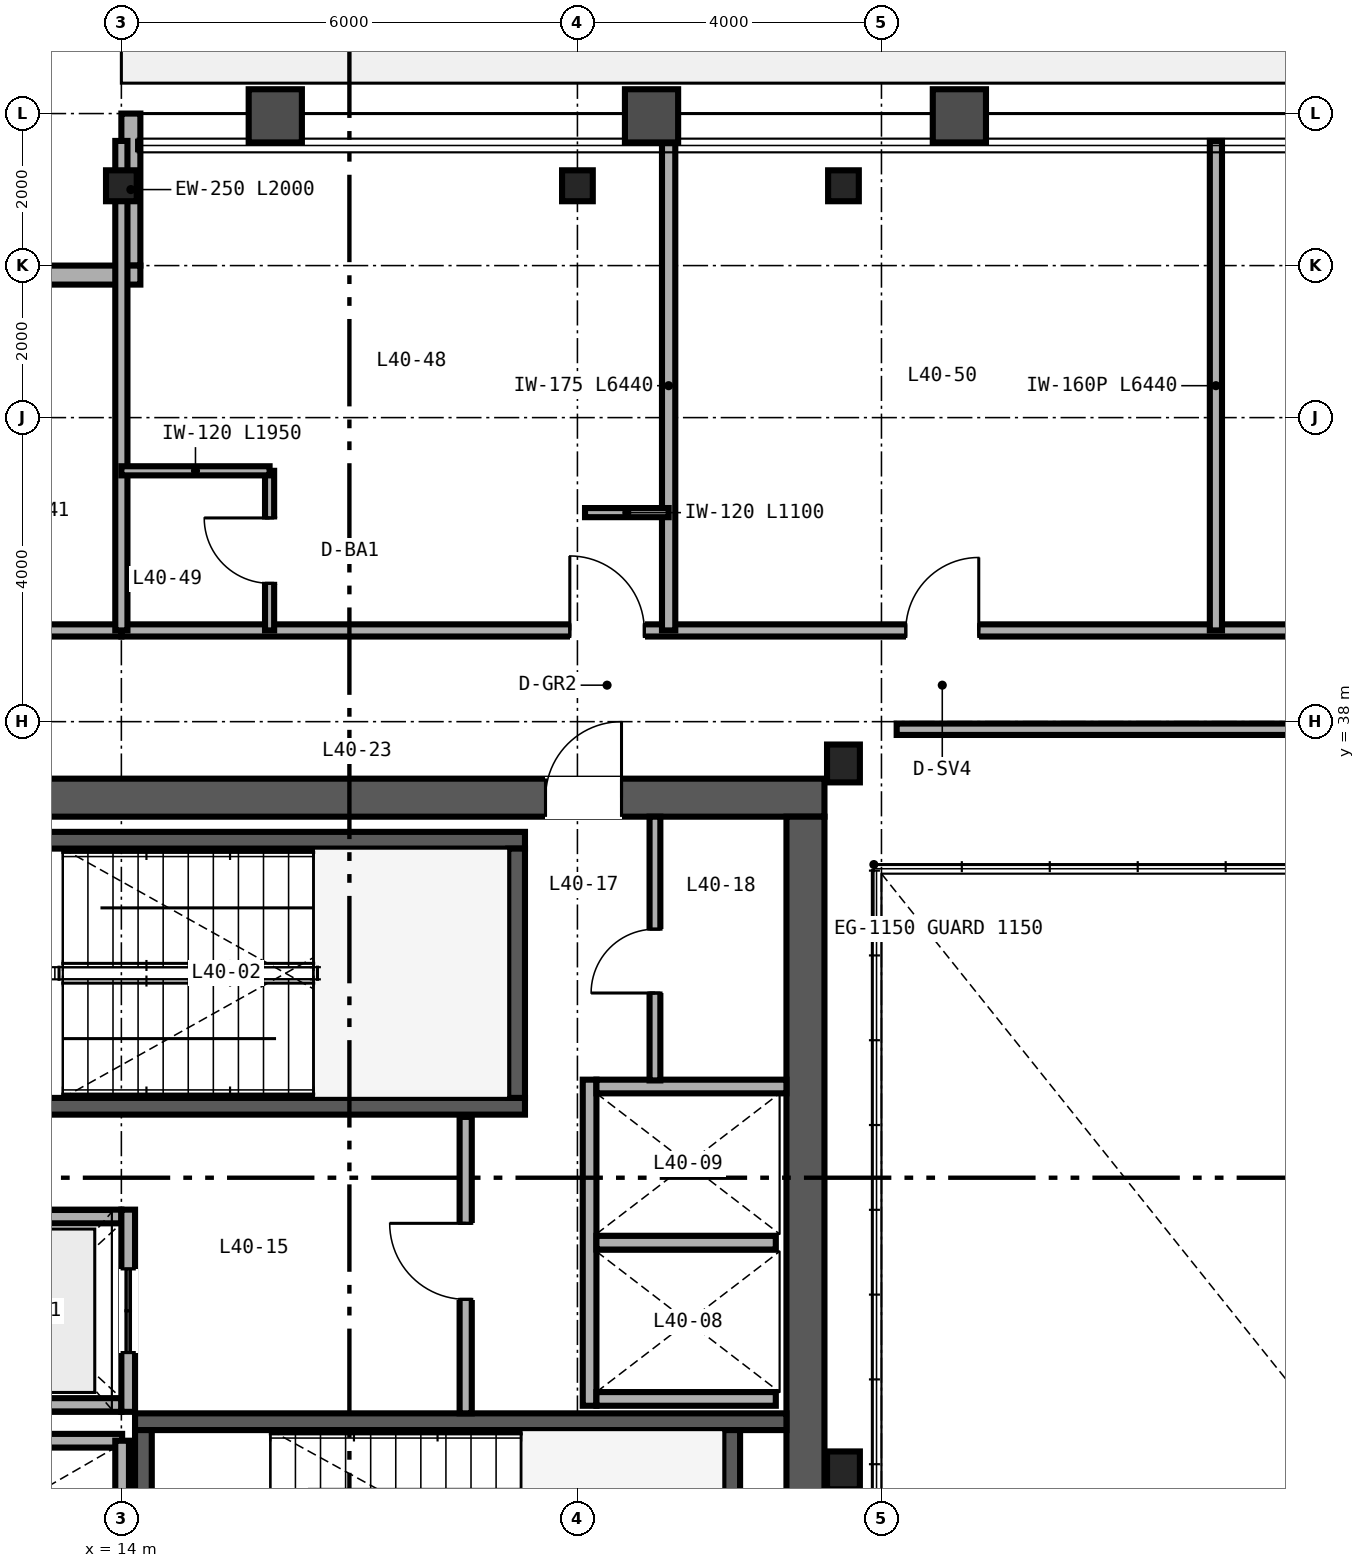
"""IFC4 building model, lengths in metres.
Left out: names, types, materials, properties, quantities, classifications, styles, units other than length and angle.
Written with IfcOpenShell. Run it as: python <this file> out.ifc"""

import sys

from ifc_helpers import new_model, si_unit, direction, frame, frame_2d, origin, origin_2d, place, context, subcontext, project, spatial, rectangle, i_section, extrude, source, transform, mapped, element, fill, save


model = new_model("IFC4")
c1 = context("Model", 3, precision=1e-05, world=origin(), true_north=direction((0.0, 1.0)))
c2 = subcontext(c1, "Body", "Model", "MODEL_VIEW")
j1 = project(units=[si_unit("LENGTHUNIT", "METRE"), si_unit("PLANEANGLEUNIT", "RADIAN")], contexts=[c1])
p1 = place(None, origin())
s1 = spatial("IfcSite", under=j1, at=p1, CompositionType="ELEMENT")
p2 = place(p1, origin())
s2 = spatial("IfcBuilding", under=s1, at=p2, CompositionType="ELEMENT")
p3 = place(p2, frame((0.0, 0.0, 163.2)))
s3 = spatial("IfcBuildingStorey", under=s2, at=p3, CompositionType="ELEMENT", Elevation=163.2)
p4 = place(p3, frame((10.75, 37.0, 0.0), z_axis=(0.0, 0.0, 1.0), x_axis=(1.0, 0.0, 0.0)))
e1 = element("IfcWall", 1, at=p4, inside=s3, PredefinedType="SHEAR", context=c2, shape_type="SweptSolid", body=[
    extrude(rectangle(XDim=12.5, YDim=0.5, at=frame_2d((6.25, 0.0))), origin(), (0.0, 0.0, 1.0), 3.37),
])
p5 = place(p4, frame((8.83, 0.0, 0.0)))
e2 = element("IfcOpeningElement", 2, at=p5, cuts=e1, PredefinedType="OPENING", context=c2, shape_type="SweptSolid", body=[
    extrude(rectangle(XDim=1.0, YDim=2.15, at=frame_2d((0.5, 1.075))), frame((0.0, 0.26, 0.0), z_axis=(0.0, -1.0, 0.0), x_axis=(1.0, 0.0, 0.0)), (0.0, 0.0, 1.0), 0.52),
])
p6 = place(p3, frame((23.0, 15.25, 0.0), z_axis=(0.0, 0.0, 1.0), x_axis=(0.0, 1.0, 0.0)))
e3 = element("IfcWall", 3, at=p6, inside=s3, PredefinedType="SHEAR", context=c2, shape_type="SweptSolid", body=[
    extrude(rectangle(XDim=21.5, YDim=0.5, at=frame_2d((10.75, 0.0))), origin(), (0.0, 0.0, 1.0), 3.37),
])
p7 = place(p3, frame((11.25, 32.94, 0.0), z_axis=(0.0, 0.0, 1.0), x_axis=(1.0, 0.0, 0.0)))
e4 = element("IfcWall", 4, at=p7, inside=s3, PredefinedType="SHEAR", context=c2, shape_type="SweptSolid", body=[
    extrude(rectangle(XDim=8.06, YDim=0.22, at=frame_2d((4.03, 0.0))), origin(), (0.0, 0.0, 1.0), 3.4),
])
p8 = place(p7, frame((0.67, 0.0, 0.0)))
e5 = element("IfcOpeningElement", 5, at=p8, cuts=e4, PredefinedType="OPENING", context=c2, shape_type="SweptSolid", body=[
    extrude(rectangle(XDim=1.05, YDim=2.15, at=frame_2d((0.525, 1.075))), frame((0.0, 0.12, 0.0), z_axis=(0.0, -1.0, 0.0), x_axis=(1.0, 0.0, 0.0)), (0.0, 0.0, 1.0), 0.24),
])
p9 = place(p3, frame((11.25, 36.44, 0.0), z_axis=(0.0, 0.0, 1.0), x_axis=(1.0, 0.0, 0.0)))
e6 = element("IfcWall", 6, at=p9, inside=s3, PredefinedType="SHEAR", context=c2, shape_type="SweptSolid", body=[
    extrude(rectangle(XDim=8.06, YDim=0.22, at=frame_2d((4.03, 0.0))), origin(), (0.0, 0.0, 1.0), 3.4),
])
p10 = place(p3, frame((19.2, 33.05, 0.0), z_axis=(0.0, 0.0, 1.0), x_axis=(0.0, 1.0, 0.0)))
e7 = element("IfcWall", 7, at=p10, inside=s3, PredefinedType="SHEAR", context=c2, shape_type="SweptSolid", body=[
    extrude(rectangle(XDim=3.28, YDim=0.22, at=frame_2d((1.64, 0.0))), origin(), (0.0, 0.0, 1.0), 3.4),
])
p11 = place(p3, frame((14.18, 28.79, 0.0), z_axis=(0.0, 0.0, 1.0), x_axis=(1.0, 0.0, 0.0)))
e8 = element("IfcWall", 8, at=p11, inside=s3, PredefinedType="SHEAR", context=c2, shape_type="SweptSolid", body=[
    extrude(rectangle(XDim=8.57, YDim=0.22, at=frame_2d((4.285, 0.0))), origin(), (0.0, 0.0, 1.0), 3.4),
])
for number, where, z_axis, x_axis in (
    (9, (14.29, 25.4, 0.0), (0.0, 0.0, 1.0), (0.0, 1.0, 0.0)),
    (10, (22.03, 25.4, 0.0), (0.0, 0.0, 1.0), (0.0, 1.0, 0.0)),
):
    element("IfcWall", number, at=place(p3, frame(where, z_axis=z_axis, x_axis=x_axis)), inside=s3, PredefinedType="SHEAR", context=c2, shape_type="SweptSolid", body=[
        extrude(rectangle(XDim=3.28, YDim=0.22, at=frame_2d((1.64, 0.0))), origin(), (0.0, 0.0, 1.0), 3.4),
    ])
m1 = source(origin(), c2, "Body", "SweptSolid", [
    extrude(i_section(OverallWidth=0.432, OverallDepth=0.498, WebThickness=0.056, FlangeThickness=0.089, FilletRadius=0.025, at=origin_2d()), origin(), (0.0, 0.0, 1.0), 3.37),
])
for number, where, z_axis, x_axis in (
    (11, (23.5, 28.15, 0.0), (0.0, 0.0, 1.0), (1.0, 0.0, 0.0)),
    (12, (23.5, 37.45, 0.0), (0.0, 0.0, 1.0), (1.0, 0.0, 0.0)),
):
    element("IfcColumn", number, at=place(p3, frame(where, z_axis=z_axis, x_axis=x_axis)), inside=s3, PredefinedType="COLUMN", context=c2, shape_type="MappedRepresentation", body=[
        mapped(m1, transform((0.0, 0.0, 0.0), scale=1.0)),
    ])
m2 = source(origin(), c2, "Body", "SweptSolid", [
    extrude(i_section(OverallWidth=0.404, OverallDepth=0.407, WebThickness=0.027, FlangeThickness=0.044, FilletRadius=0.025, at=origin_2d()), origin(), (0.0, 0.0, 1.0), 3.37),
])
for number, where, z_axis, x_axis in (
    (13, (14.0, 45.05, 0.0), (0.0, 0.0, 1.0), (1.0, 0.0, 0.0)),
    (14, (20.0, 45.05, 0.0), (0.0, 0.0, 1.0), (1.0, 0.0, 0.0)),
    (15, (23.5, 45.05, 0.0), (0.0, 0.0, 1.0), (1.0, 0.0, 0.0)),
):
    element("IfcColumn", number, at=place(p3, frame(where, z_axis=z_axis, x_axis=x_axis)), inside=s3, PredefinedType="COLUMN", context=c2, shape_type="MappedRepresentation", body=[
        mapped(m2, transform((0.0, 0.0, 0.0), scale=1.0)),
    ])
p12 = place(p3, frame((14.125, 46.0, 0.0), z_axis=(0.0, 0.0, 1.0), x_axis=(0.0, -1.0, 0.0)))
e16 = element("IfcWall", 16, at=p12, inside=s3, PredefinedType="SOLIDWALL", context=c2, shape_type="SweptSolid", body=[
    extrude(rectangle(XDim=2.0, YDim=0.25, at=frame_2d((1.0, 0.0))), origin(), (0.0, 0.0, 1.0), 2.677),
])
p13 = place(p3, frame((14.25, 43.875, 0.0), z_axis=(0.0, 0.0, 1.0), x_axis=(-1.0, 0.0, 0.0)))
e17 = element("IfcWall", 17, at=p13, inside=s3, PredefinedType="SOLIDWALL", context=c2, shape_type="SweptSolid", body=[
    extrude(rectangle(XDim=2.0, YDim=0.25, at=frame_2d((1.0, 0.0))), origin(), (0.0, 0.0, 1.0), 3.37),
])
p14 = place(p3, frame((20.16, 29.0, 0.0), z_axis=(0.0, 0.0, 1.0), x_axis=(0.0, 1.0, 0.0)))
e18 = element("IfcWall", 18, at=p14, inside=s3, PredefinedType="SOLIDWALL", context=c2, shape_type="SweptSolid", body=[
    extrude(rectangle(XDim=4.29, YDim=0.18, at=frame_2d((2.145, 0.0))), origin(), (0.0, 0.0, 1.0), 3.37),
])
p15 = place(p3, frame((20.25, 29.09, 0.0), z_axis=(0.0, 0.0, 1.0), x_axis=(1.0, 0.0, 0.0)))
e19 = element("IfcWall", 19, at=p15, inside=s3, PredefinedType="SOLIDWALL", context=c2, shape_type="SweptSolid", body=[
    extrude(rectangle(XDim=2.36, YDim=0.18, at=frame_2d((1.18, 0.0))), origin(), (0.0, 0.0, 1.0), 3.37),
])
p16 = place(p3, frame((20.25, 33.2, 0.0), z_axis=(0.0, 0.0, 1.0), x_axis=(1.0, 0.0, 0.0)))
e20 = element("IfcWall", 20, at=p16, inside=s3, PredefinedType="SOLIDWALL", context=c2, shape_type="SweptSolid", body=[
    extrude(rectangle(XDim=2.5, YDim=0.18, at=frame_2d((1.25, 0.0))), origin(), (0.0, 0.0, 1.0), 3.37),
])
p17 = place(p3, frame((20.25, 31.145, 0.0), z_axis=(0.0, 0.0, 1.0), x_axis=(1.0, 0.0, 0.0)))
e21 = element("IfcWall", 21, at=p17, inside=s3, PredefinedType="SOLIDWALL", context=c2, shape_type="SweptSolid", body=[
    extrude(rectangle(XDim=2.36, YDim=0.18, at=frame_2d((1.18, 0.0))), origin(), (0.0, 0.0, 1.0), 3.37),
])
for number, where, z_axis, x_axis in (
    (22, (11.5, 29.01, 0.0), (0.0, 0.0, 1.0), (1.0, 0.0, 0.0)),
    (23, (11.5, 31.49, 0.0), (0.0, 0.0, 1.0), (1.0, 0.0, 0.0)),
):
    element("IfcWall", number, at=place(p3, frame(where, z_axis=z_axis, x_axis=x_axis)), inside=s3, PredefinedType="SOLIDWALL", context=c2, shape_type="SweptSolid", body=[
        extrude(rectangle(XDim=2.5, YDim=0.18, at=frame_2d((1.25, 0.0))), origin(), (0.0, 0.0, 1.0), 3.37),
    ])
p18 = place(p3, frame((14.09, 28.92, 0.0), z_axis=(0.0, 0.0, 1.0), x_axis=(0.0, 1.0, 0.0)))
e24 = element("IfcWall", 24, at=p18, inside=s3, PredefinedType="SOLIDWALL", context=c2, shape_type="SweptSolid", body=[
    extrude(rectangle(XDim=2.66, YDim=0.18, at=frame_2d((1.33, 0.0))), origin(), (0.0, 0.0, 1.0), 3.37),
])
p19 = place(p18, frame((0.78, 0.0, 0.0)))
e25 = element("IfcOpeningElement", 25, at=p19, cuts=e24, PredefinedType="OPENING", context=c2, shape_type="SweptSolid", body=[
    extrude(rectangle(XDim=1.1, YDim=2.2, at=frame_2d((0.55, 1.1))), frame((0.0, 0.1, 0.0), z_axis=(0.0, -1.0, 0.0), x_axis=(1.0, 0.0, 0.0)), (0.0, 0.0, 1.0), 0.2),
])
p20 = place(p3, frame((11.5, 28.54, 0.0), z_axis=(0.0, 0.0, 1.0), x_axis=(1.0, 0.0, 0.0)))
e26 = element("IfcWall", 26, at=p20, inside=s3, PredefinedType="SOLIDWALL", context=c2, shape_type="SweptSolid", body=[
    extrude(rectangle(XDim=2.51, YDim=0.18, at=frame_2d((1.255, 0.0))), origin(), (0.0, 0.0, 1.0), 3.37),
])
p21 = place(p3, frame((14.01, 25.46, 0.0), z_axis=(0.0, 0.0, 1.0), x_axis=(0.0, 1.0, 0.0)))
e27 = element("IfcWall", 27, at=p21, inside=s3, PredefinedType="SOLIDWALL", context=c2, shape_type="SweptSolid", body=[
    extrude(rectangle(XDim=3.08, YDim=0.18, at=frame_2d((1.54, 0.0))), origin(), (0.0, 0.0, 1.0), 3.37),
])
p22 = place(p3, frame((18.53, 28.9, 0.0), z_axis=(0.0, 0.0, 1.0), x_axis=(0.0, 1.0, 0.0)))
e28 = element("IfcWall", 28, at=p22, inside=s3, PredefinedType="PARTITIONING", context=c2, shape_type="SweptSolid", body=[
    extrude(rectangle(XDim=3.9, YDim=0.16, at=frame_2d((1.95, 0.0))), origin(), (0.0, 0.0, 1.0), 3.37),
])
p23 = place(p22, frame((1.5, 0.0, 0.0)))
e29 = element("IfcOpeningElement", 29, at=p23, cuts=e28, PredefinedType="OPENING", context=c2, shape_type="SweptSolid", body=[
    extrude(rectangle(XDim=1.0, YDim=2.15, at=frame_2d((0.5, 1.075))), frame((0.0, 0.09, 0.0), z_axis=(0.0, -1.0, 0.0), x_axis=(1.0, 0.0, 0.0)), (0.0, 0.0, 1.0), 0.18),
])
p24 = place(p3, frame((21.02, 33.28, 0.0), z_axis=(0.0, 0.0, 1.0), x_axis=(0.0, 1.0, 0.0)))
e30 = element("IfcWall", 30, at=p24, inside=s3, PredefinedType="PARTITIONING", context=c2, shape_type="SweptSolid", body=[
    extrude(rectangle(XDim=3.47, YDim=0.142, at=frame_2d((1.735, 0.0))), origin(), (0.0, 0.0, 1.0), 3.37),
])
p25 = place(p24, frame((1.15, 0.0, 0.0)))
e31 = element("IfcOpeningElement", 31, at=p25, cuts=e30, PredefinedType="OPENING", context=c2, shape_type="SweptSolid", body=[
    extrude(rectangle(XDim=0.84, YDim=2.1, at=frame_2d((0.42, 1.05))), frame((0.0, 0.081, 0.0), z_axis=(0.0, -1.0, 0.0), x_axis=(1.0, 0.0, 0.0)), (0.0, 0.0, 1.0), 0.162),
])
p26 = place(p3, frame((24.2, 37.9, 0.0), z_axis=(0.0, 0.0, 1.0), x_axis=(1.0, 0.0, 0.0)))
e32 = element("IfcWall", 32, at=p26, inside=s3, PredefinedType="PARTITIONING", context=c2, shape_type="SweptSolid", body=[
    extrude(rectangle(XDim=15.6, YDim=0.15, at=frame_2d((7.8, 0.0))), origin(), (0.0, 0.0, 1.0), 3.37),
])
p27 = place(p26, frame((7.0, 0.0, 0.0)))
e33 = element("IfcOpeningElement", 33, at=p27, cuts=e32, PredefinedType="OPENING", context=c2, shape_type="SweptSolid", body=[
    extrude(rectangle(XDim=0.96, YDim=2.15, at=frame_2d((0.48, 1.075))), frame((0.0, 0.085, 0.0), z_axis=(0.0, -1.0, 0.0), x_axis=(1.0, 0.0, 0.0)), (0.0, 0.0, 1.0), 0.17),
])
p28 = place(p3, frame((10.0, 39.2, 0.0), z_axis=(0.0, 0.0, 1.0), x_axis=(1.0, 0.0, 0.0)))
e34 = element("IfcWall", 34, at=p28, inside=s3, PredefinedType="PARTITIONING", context=c2, shape_type="SweptSolid", body=[
    extrude(rectangle(XDim=4.0, YDim=0.16, at=frame_2d((2.0, 0.0))), origin(), (0.0, 0.0, 1.0), 3.37),
])
p29 = place(p28, frame((1.52, 0.0, 0.0)))
e35 = element("IfcOpeningElement", 35, at=p29, cuts=e34, PredefinedType="OPENING", context=c2, shape_type="SweptSolid", body=[
    extrude(rectangle(XDim=0.96, YDim=2.15, at=frame_2d((0.48, 1.075))), frame((0.0, 0.09, 0.0), z_axis=(0.0, -1.0, 0.0), x_axis=(1.0, 0.0, 0.0)), (0.0, 0.0, 1.0), 0.18),
])
p30 = place(p3, frame((14.0, 39.2, 0.0), z_axis=(0.0, 0.0, 1.0), x_axis=(1.0, 0.0, 0.0)))
e36 = element("IfcWall", 36, at=p30, inside=s3, PredefinedType="PARTITIONING", context=c2, shape_type="SweptSolid", body=[
    extrude(rectangle(XDim=36.0, YDim=0.16, at=frame_2d((18.0, 0.0))), origin(), (0.0, 0.0, 1.0), 2.913),
])
p31 = place(p30, frame((5.9, 0.0, 0.0)))
e37 = element("IfcOpeningElement", 37, at=p31, cuts=e36, PredefinedType="OPENING", context=c2, shape_type="SweptSolid", body=[
    extrude(rectangle(XDim=0.98, YDim=2.2, at=frame_2d((0.49, 1.1))), frame((0.0, 0.09, 0.0), z_axis=(0.0, -1.0, 0.0), x_axis=(1.0, 0.0, 0.0)), (0.0, 0.0, 1.0), 0.18),
])
p32 = place(p30, frame((10.32, 0.0, 0.0)))
e38 = element("IfcOpeningElement", 38, at=p32, cuts=e36, PredefinedType="OPENING", context=c2, shape_type="SweptSolid", body=[
    extrude(rectangle(XDim=0.96, YDim=2.15, at=frame_2d((0.48, 1.075))), frame((0.0, 0.09, 0.0), z_axis=(0.0, -1.0, 0.0), x_axis=(1.0, 0.0, 0.0)), (0.0, 0.0, 1.0), 0.18),
])
p33 = place(p30, frame((17.52, 0.0, 0.0)))
e39 = element("IfcOpeningElement", 39, at=p33, cuts=e36, PredefinedType="OPENING", context=c2, shape_type="SweptSolid", body=[
    extrude(rectangle(XDim=0.96, YDim=2.15, at=frame_2d((0.48, 1.075))), frame((0.0, 0.09, 0.0), z_axis=(0.0, -1.0, 0.0), x_axis=(1.0, 0.0, 0.0)), (0.0, 0.0, 1.0), 0.18),
])
p34 = place(p30, frame((24.72, 0.0, 0.0)))
e40 = element("IfcOpeningElement", 40, at=p34, cuts=e36, PredefinedType="OPENING", context=c2, shape_type="SweptSolid", body=[
    extrude(rectangle(XDim=0.96, YDim=2.15, at=frame_2d((0.48, 1.075))), frame((0.0, 0.09, 0.0), z_axis=(0.0, -1.0, 0.0), x_axis=(1.0, 0.0, 0.0)), (0.0, 0.0, 1.0), 0.18),
])
p35 = place(p30, frame((34.7, 0.0, 0.0)))
e41 = element("IfcOpeningElement", 41, at=p35, cuts=e36, PredefinedType="OPENING", context=c2, shape_type="SweptSolid", body=[
    extrude(rectangle(XDim=0.98, YDim=2.2, at=frame_2d((0.49, 1.1))), frame((0.0, 0.09, 0.0), z_axis=(0.0, -1.0, 0.0), x_axis=(1.0, 0.0, 0.0)), (0.0, 0.0, 1.0), 0.18),
])
p36 = place(p3, frame((14.0, 39.2, 0.0), z_axis=(0.0, 0.0, 1.0), x_axis=(0.0, 1.0, 0.0)))
e42 = element("IfcWall", 42, at=p36, inside=s3, PredefinedType="PARTITIONING", context=c2, shape_type="SweptSolid", body=[
    extrude(rectangle(XDim=6.44, YDim=0.16, at=frame_2d((3.22, 0.0))), origin(), (0.0, 0.0, 1.0), 2.677),
])
p37 = place(p3, frame((21.2, 39.2, 0.0), z_axis=(0.0, 0.0, 1.0), x_axis=(0.0, 1.0, 0.0)))
e43 = element("IfcWall", 43, at=p37, inside=s3, PredefinedType="PARTITIONING", context=c2, shape_type="SweptSolid", body=[
    extrude(rectangle(XDim=6.44, YDim=0.175, at=frame_2d((3.22, 0.0))), origin(), (0.0, 0.0, 1.0), 2.833),
])
p38 = place(p3, frame((15.95, 39.2, 0.0), z_axis=(0.0, 0.0, 1.0), x_axis=(0.0, 1.0, 0.0)))
e44 = element("IfcWall", 44, at=p38, inside=s3, PredefinedType="PARTITIONING", context=c2, shape_type="SweptSolid", body=[
    extrude(rectangle(XDim=2.1, YDim=0.12, at=frame_2d((1.05, 0.0))), origin(), (0.0, 0.0, 1.0), 3.37),
])
p39 = place(p38, frame((0.62, 0.0, 0.0)))
e45 = element("IfcOpeningElement", 45, at=p39, cuts=e44, PredefinedType="OPENING", context=c2, shape_type="SweptSolid", body=[
    extrude(rectangle(XDim=0.86, YDim=2.1, at=frame_2d((0.43, 1.05))), frame((0.0, 0.07, 0.0), z_axis=(0.0, -1.0, 0.0), x_axis=(1.0, 0.0, 0.0)), (0.0, 0.0, 1.0), 0.14),
])
p40 = place(p3, frame((14.0, 41.3, 0.0), z_axis=(0.0, 0.0, 1.0), x_axis=(1.0, 0.0, 0.0)))
e46 = element("IfcWall", 46, at=p40, inside=s3, PredefinedType="PARTITIONING", context=c2, shape_type="SweptSolid", body=[
    extrude(rectangle(XDim=1.95, YDim=0.12, at=frame_2d((0.975, 0.0))), origin(), (0.0, 0.0, 1.0), 3.37),
])
p41 = place(p3, frame((20.1, 40.75, 0.0), z_axis=(0.0, 0.0, 1.0), x_axis=(1.0, 0.0, 0.0)))
e47 = element("IfcWall", 47, at=p41, inside=s3, PredefinedType="PARTITIONING", context=c2, shape_type="SweptSolid", body=[
    extrude(rectangle(XDim=1.1, YDim=0.12, at=frame_2d((0.55, 0.0))), origin(), (0.0, 0.0, 1.0), 3.37),
])
p42 = place(p3, frame((28.4, 39.2, 0.0), z_axis=(0.0, 0.0, 1.0), x_axis=(0.0, 1.0, 0.0)))
e48 = element("IfcWall", 48, at=p42, inside=s3, PredefinedType="PARTITIONING", context=c2, shape_type="SweptSolid", body=[
    extrude(rectangle(XDim=6.44, YDim=0.16, at=frame_2d((3.22, 0.0))), origin(), (0.0, 0.0, 1.0), 2.443),
])
m3 = source(origin(), c2, "Body", "SweptSolid", [
    extrude(rectangle(XDim=1.1, YDim=2.2, at=frame_2d((0.55, 1.1))), frame((0.0, 0.025, 0.0), z_axis=(0.0, -1.0, 0.0), x_axis=(1.0, 0.0, 0.0)), (0.0, 0.0, 1.0), 0.05),
])
p43 = place(p19, origin())
e49 = element("IfcDoor", 49, at=p43, inside=s3, OperationType="DOUBLE_DOOR_SLIDING", PredefinedType="DOOR", context=c2, shape_type="MappedRepresentation", body=[
    mapped(m3, transform((0.0, 0.0, 0.0), scale=1.0)),
])
fill(e25, e49)
m4 = source(origin(), c2, "Body", "SweptSolid", [
    extrude(rectangle(XDim=1.0, YDim=2.15, at=frame_2d((0.5, 1.075))), frame((0.0, 0.025, 0.0), z_axis=(0.0, -1.0, 0.0), x_axis=(1.0, 0.0, 0.0)), (0.0, 0.0, 1.0), 0.05),
])
p44 = place(p23, origin())
e50 = element("IfcDoor", 50, at=p44, inside=s3, OperationType="SINGLE_SWING_RIGHT", PredefinedType="DOOR", context=c2, shape_type="MappedRepresentation", body=[
    mapped(m4, transform((0.0, 0.0, 0.0), scale=1.0)),
])
fill(e29, e50)
m5 = source(origin(), c2, "Body", "SweptSolid", [
    extrude(rectangle(XDim=0.84, YDim=2.1, at=frame_2d((0.42, 1.05))), frame((0.0, 0.025, 0.0), z_axis=(0.0, -1.0, 0.0), x_axis=(1.0, 0.0, 0.0)), (0.0, 0.0, 1.0), 0.05),
])
p45 = place(p25, origin())
e51 = element("IfcDoor", 51, at=p45, inside=s3, OperationType="SINGLE_SWING_LEFT", PredefinedType="DOOR", context=c2, shape_type="MappedRepresentation", body=[
    mapped(m5, transform((0.0, 0.0, 0.0), scale=1.0)),
])
fill(e31, e51)
p46 = place(p5, origin())
e52 = element("IfcDoor", 52, at=p46, inside=s3, OperationType="SINGLE_SWING_RIGHT", PredefinedType="DOOR", context=c2, shape_type="MappedRepresentation", body=[
    mapped(m4, transform((0.0, 0.0, 0.0), scale=1.0)),
])
fill(e2, e52)
m6 = source(origin(), c2, "Body", "SweptSolid", [
    extrude(rectangle(XDim=0.86, YDim=2.1, at=frame_2d((0.43, 1.05))), frame((0.0, 0.025, 0.0), z_axis=(0.0, -1.0, 0.0), x_axis=(1.0, 0.0, 0.0)), (0.0, 0.0, 1.0), 0.05),
])
p47 = place(p39, origin())
e53 = element("IfcDoor", 53, at=p47, inside=s3, OperationType="SINGLE_SWING_RIGHT", PredefinedType="DOOR", context=c2, shape_type="MappedRepresentation", body=[
    mapped(m6, transform((0.0, 0.0, 0.0), scale=1.0)),
])
fill(e45, e53)
m7 = source(origin(), c2, "Body", "SweptSolid", [
    extrude(rectangle(XDim=0.98, YDim=2.2, at=frame_2d((0.49, 1.1))), frame((0.0, 0.025, 0.0), z_axis=(0.0, -1.0, 0.0), x_axis=(1.0, 0.0, 0.0)), (0.0, 0.0, 1.0), 0.05),
])
p48 = place(p31, origin())
e54 = element("IfcDoor", 54, at=p48, inside=s3, OperationType="SINGLE_SWING_LEFT", PredefinedType="DOOR", context=c2, shape_type="MappedRepresentation", body=[
    mapped(m7, transform((0.0, 0.0, 0.0), scale=1.0)),
])
fill(e37, e54)
m8 = source(origin(), c2, "Body", "SweptSolid", [
    extrude(rectangle(XDim=0.96, YDim=2.15, at=frame_2d((0.48, 1.075))), frame((0.0, 0.025, 0.0), z_axis=(0.0, -1.0, 0.0), x_axis=(1.0, 0.0, 0.0)), (0.0, 0.0, 1.0), 0.05),
])
p49 = place(p32, origin())
e55 = element("IfcDoor", 55, at=p49, inside=s3, OperationType="SINGLE_SWING_RIGHT", PredefinedType="DOOR", context=c2, shape_type="MappedRepresentation", body=[
    mapped(m8, transform((0.0, 0.0, 0.0), scale=1.0)),
])
fill(e38, e55)
save(model, sys.argv[1])
